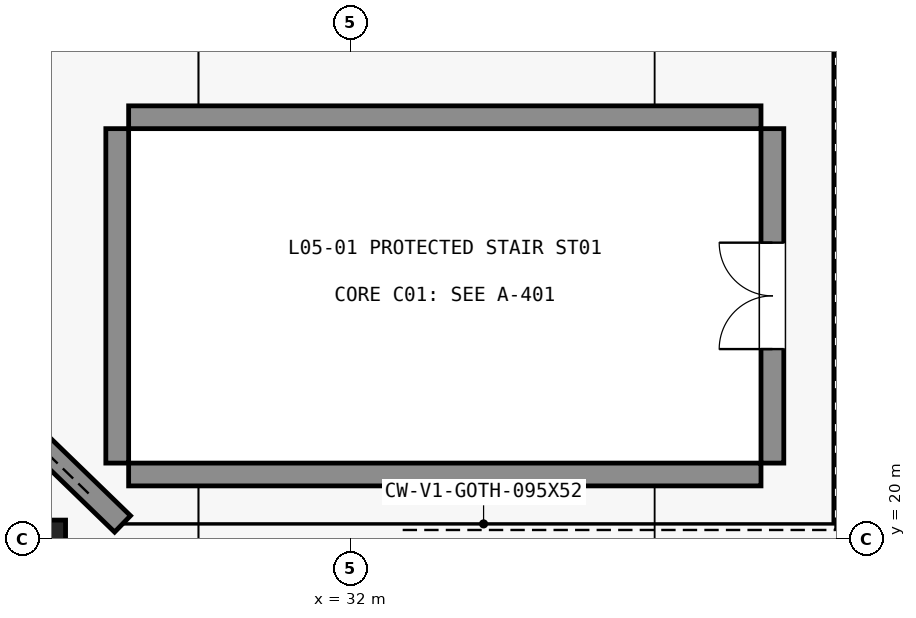
"""IFC4 building model, lengths in metres.
Left out: names, types, materials, properties, quantities, classifications, styles, units other than length and angle.
Written with IfcOpenShell. Run it as: python <this file> out.ifc"""

import sys

from ifc_helpers import new_model, si_unit, direction, frame, frame_2d, origin, origin_2d, place, context, subcontext, project, spatial, rectangle, extrude, element, fill, save


model = new_model("IFC4")
c1 = context("Model", 3, precision=1e-05, world=origin(), true_north=direction((0.0, 1.0)))
c2 = subcontext(c1, "Body", "Model", "MODEL_VIEW")
j1 = project(units=[si_unit("LENGTHUNIT", "METRE"), si_unit("PLANEANGLEUNIT", "RADIAN")], contexts=[c1])
p1 = place(None, origin())
s1 = spatial("IfcSite", under=j1, at=p1, CompositionType="ELEMENT")
p2 = place(p1, origin())
s2 = spatial("IfcBuilding", under=s1, at=p2, CompositionType="ELEMENT")
p3 = place(p2, frame((0.0, 0.0, 26.4)))
s3 = spatial("IfcBuildingStorey", under=s2, at=p3, CompositionType="ELEMENT", Elevation=26.4)
p4 = place(p3, frame((28.0, 20.0, -0.32), z_axis=(0.0, 0.0, 1.0), x_axis=(1.0, 0.0, 0.0)))
e1 = element("IfcColumn", 1, at=p4, inside=s3, PredefinedType="PILASTER", context=c2, shape_type="SweptSolid", body=[
    extrude(rectangle(XDim=0.5, YDim=0.5, at=origin_2d()), origin(), (0.0, 0.0, 1.0), 1.67),
])
for number, where, z_axis, x_axis in (
    (2, (29.08, 20.85, 0.0), (0.0, 0.0, 1.0), (1.0, 0.0, 0.0)),
    (3, (29.08, 25.55, 0.0), (0.0, 0.0, 1.0), (1.0, 0.0, 0.0)),
):
    element("IfcWall", number, at=place(p3, frame(where, z_axis=z_axis, x_axis=x_axis)), inside=s3, PredefinedType="SHEAR", context=c2, shape_type="SweptSolid", body=[
        extrude(rectangle(XDim=8.32, YDim=0.3, at=frame_2d((4.16, 0.0))), origin(), (0.0, 0.0, 1.0), 5.18),
    ])
p5 = place(p3, frame((28.93, 21.0, 0.0), z_axis=(0.0, 0.0, 1.0), x_axis=(0.0, 1.0, 0.0)))
e4 = element("IfcWall", 4, at=p5, inside=s3, PredefinedType="SHEAR", context=c2, shape_type="SweptSolid", body=[
    extrude(rectangle(XDim=4.4, YDim=0.3, at=frame_2d((2.2, 0.0))), origin(), (0.0, 0.0, 1.0), 5.18),
])
p6 = place(p3, frame((37.55, 21.0, 0.0), z_axis=(0.0, 0.0, 1.0), x_axis=(0.0, 1.0, 0.0)))
e5 = element("IfcWall", 5, at=p6, inside=s3, PredefinedType="SHEAR", context=c2, shape_type="SweptSolid", body=[
    extrude(rectangle(XDim=4.4, YDim=0.3, at=frame_2d((2.2, 0.0))), origin(), (0.0, 0.0, 1.0), 5.18),
])
p7 = place(p6, frame((1.5, 0.0, 0.0)))
e6 = element("IfcOpeningElement", 6, at=p7, cuts=e5, PredefinedType="OPENING", context=c2, shape_type="SweptSolid", body=[
    extrude(rectangle(XDim=1.4, YDim=2.2, at=frame_2d((0.7, 1.1))), frame((0.0, 0.16, 0.0), z_axis=(0.0, -1.0, 0.0), x_axis=(1.0, 0.0, 0.0)), (0.0, 0.0, 1.0), 0.32),
])
p8 = place(p3, frame((16.2, 32.6, 0.0), z_axis=(0.0, 0.0, 1.0), x_axis=(0.718237441527, -0.695798086796, 0.0)))
e7 = element("IfcWall", 7, at=p8, inside=s3, PredefinedType="STANDARD", context=c2, shape_type="SweptSolid", body=[
    extrude(rectangle(XDim=17.822, YDim=0.3, at=frame_2d((8.911, 0.0))), origin(), (0.0, 0.0, 1.0), 5.18),
])
p9 = place(p8, frame((1.1, 0.0, 0.95)))
e8 = element("IfcOpeningElement", 8, at=p9, cuts=e7, PredefinedType="OPENING", context=c2, shape_type="SweptSolid", body=[
    extrude(rectangle(XDim=0.9, YDim=2.85, at=frame_2d((0.45, 1.425))), frame((0.0, 0.16, 0.0), z_axis=(0.0, -1.0, 0.0), x_axis=(1.0, 0.0, 0.0)), (0.0, 0.0, 1.0), 0.32),
])
p10 = place(p8, frame((2.45, 0.0, 0.95)))
e9 = element("IfcOpeningElement", 9, at=p10, cuts=e7, PredefinedType="OPENING", context=c2, shape_type="SweptSolid", body=[
    extrude(rectangle(XDim=0.9, YDim=2.85, at=frame_2d((0.45, 1.425))), frame((0.0, 0.16, 0.0), z_axis=(0.0, -1.0, 0.0), x_axis=(1.0, 0.0, 0.0)), (0.0, 0.0, 1.0), 0.32),
])
p11 = place(p8, frame((4.3, 0.0, 0.95)))
e10 = element("IfcOpeningElement", 10, at=p11, cuts=e7, PredefinedType="OPENING", context=c2, shape_type="SweptSolid", body=[
    extrude(rectangle(XDim=0.9, YDim=2.85, at=frame_2d((0.45, 1.425))), frame((0.0, 0.16, 0.0), z_axis=(0.0, -1.0, 0.0), x_axis=(1.0, 0.0, 0.0)), (0.0, 0.0, 1.0), 0.32),
])
p12 = place(p8, frame((5.65, 0.0, 0.95)))
e11 = element("IfcOpeningElement", 11, at=p12, cuts=e7, PredefinedType="OPENING", context=c2, shape_type="SweptSolid", body=[
    extrude(rectangle(XDim=0.9, YDim=2.85, at=frame_2d((0.45, 1.425))), frame((0.0, 0.16, 0.0), z_axis=(0.0, -1.0, 0.0), x_axis=(1.0, 0.0, 0.0)), (0.0, 0.0, 1.0), 0.32),
])
p13 = place(p8, frame((7.5, 0.0, 0.95)))
e12 = element("IfcOpeningElement", 12, at=p13, cuts=e7, PredefinedType="OPENING", context=c2, shape_type="SweptSolid", body=[
    extrude(rectangle(XDim=0.9, YDim=2.85, at=frame_2d((0.45, 1.425))), frame((0.0, 0.16, 0.0), z_axis=(0.0, -1.0, 0.0), x_axis=(1.0, 0.0, 0.0)), (0.0, 0.0, 1.0), 0.32),
])
p14 = place(p8, frame((8.85, 0.0, 0.95)))
e13 = element("IfcOpeningElement", 13, at=p14, cuts=e7, PredefinedType="OPENING", context=c2, shape_type="SweptSolid", body=[
    extrude(rectangle(XDim=0.9, YDim=2.85, at=frame_2d((0.45, 1.425))), frame((0.0, 0.16, 0.0), z_axis=(0.0, -1.0, 0.0), x_axis=(1.0, 0.0, 0.0)), (0.0, 0.0, 1.0), 0.32),
])
p15 = place(p8, frame((13.9, 0.0, 0.95)))
e14 = element("IfcOpeningElement", 14, at=p15, cuts=e7, PredefinedType="OPENING", context=c2, shape_type="SweptSolid", body=[
    extrude(rectangle(XDim=0.9, YDim=2.85, at=frame_2d((0.45, 1.425))), frame((0.0, 0.16, 0.0), z_axis=(0.0, -1.0, 0.0), x_axis=(1.0, 0.0, 0.0)), (0.0, 0.0, 1.0), 0.32),
])
p16 = place(p8, frame((15.25, 0.0, 0.95)))
e15 = element("IfcOpeningElement", 15, at=p16, cuts=e7, PredefinedType="OPENING", context=c2, shape_type="SweptSolid", body=[
    extrude(rectangle(XDim=0.9, YDim=2.85, at=frame_2d((0.45, 1.425))), frame((0.0, 0.16, 0.0), z_axis=(0.0, -1.0, 0.0), x_axis=(1.0, 0.0, 0.0)), (0.0, 0.0, 1.0), 0.32),
])
p17 = place(p7, origin())
e16 = element("IfcDoor", 16, at=p17, inside=s3, OperationType="DOUBLE_DOOR_SINGLE_SWING", PredefinedType="DOOR", context=c2, shape_type="SweptSolid", body=[
    extrude(rectangle(XDim=1.4, YDim=2.2, at=frame_2d((0.7, 1.1))), frame((0.0, 0.025, 0.0), z_axis=(0.0, -1.0, 0.0), x_axis=(1.0, 0.0, 0.0)), (0.0, 0.0, 1.0), 0.05),
])
fill(e6, e16)
save(model, sys.argv[1])
